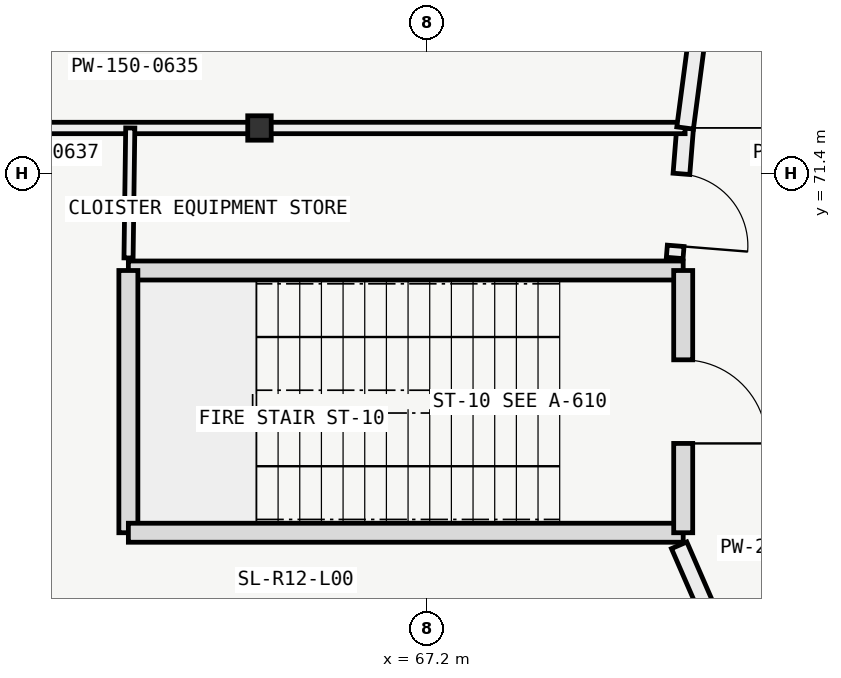
"""IFC4 building model, lengths in metres.
Left out: names, types, materials, properties, quantities, classifications, styles, units other than length and angle.
Written with IfcOpenShell. Run it as: python <this file> out.ifc"""

import sys

from ifc_helpers import new_model, si_unit, direction, frame, frame_2d, origin, origin_2d, place, context, subcontext, project, spatial, rectangle, i_section, extrude, element, fill, save


model = new_model("IFC4")
c1 = context("Model", 3, precision=1e-05, world=origin(), true_north=direction((0.0, 1.0)))
c2 = subcontext(c1, "Body", "Model", "MODEL_VIEW")
j1 = project(units=[si_unit("LENGTHUNIT", "METRE"), si_unit("PLANEANGLEUNIT", "RADIAN")], contexts=[c1])
p1 = place(None, origin())
s1 = spatial("IfcSite", under=j1, at=p1, CompositionType="ELEMENT")
p2 = place(p1, origin())
s2 = spatial("IfcBuilding", under=s1, at=p2, CompositionType="ELEMENT")
p3 = place(p2, origin())
s3 = spatial("IfcBuildingStorey", under=s2, at=p3, CompositionType="ELEMENT", Elevation=0.0)
p4 = place(p3, frame((65.0, 72.0, -0.4), z_axis=(0.0, 0.0, 1.0), x_axis=(1.0, 0.0, 0.0)))
e1 = element("IfcColumn", 1, at=p4, inside=s3, PredefinedType="COLUMN", context=c2, shape_type="SweptSolid", body=[
    extrude(i_section(OverallWidth=0.309, OverallDepth=0.321, WebThickness=0.014, FlangeThickness=0.022, FilletRadius=0.017, at=origin_2d()), origin(), (0.0, 0.0, 1.0), 5.8),
])
p5 = place(p3, frame((70.575, 70.125, -0.4), z_axis=(0.0, 0.0, 1.0), x_axis=(-1.0, 0.0, 0.0)))
e2 = element("IfcWall", 2, at=p5, inside=s3, PredefinedType="SOLIDWALL", context=c2, shape_type="SweptSolid", body=[
    extrude(rectangle(XDim=7.3, YDim=0.25, at=frame_2d((3.65, 0.0))), origin(), (0.0, 0.0, 1.0), 5.52),
])
p6 = place(p3, frame((63.275, 70.125, -0.4), z_axis=(0.0, 0.0, 1.0), x_axis=(0.0, -1.0, 0.0)))
e3 = element("IfcWall", 3, at=p6, inside=s3, PredefinedType="SOLIDWALL", context=c2, shape_type="SweptSolid", body=[
    extrude(rectangle(XDim=3.45, YDim=0.25, at=frame_2d((1.725, 0.0))), origin(), (0.0, 0.0, 1.0), 5.52),
])
p7 = place(p3, frame((63.275, 66.675, -0.4), z_axis=(0.0, 0.0, 1.0), x_axis=(1.0, 0.0, 0.0)))
e4 = element("IfcWall", 4, at=p7, inside=s3, PredefinedType="SOLIDWALL", context=c2, shape_type="SweptSolid", body=[
    extrude(rectangle(XDim=7.3, YDim=0.25, at=frame_2d((3.65, 0.0))), origin(), (0.0, 0.0, 1.0), 5.52),
])
p8 = place(p3, frame((70.575, 70.125, -0.4), z_axis=(0.0, 0.0, 1.0), x_axis=(0.0, -1.0, 0.0)))
e5 = element("IfcWall", 5, at=p8, inside=s3, PredefinedType="SOLIDWALL", context=c2, shape_type="SweptSolid", body=[
    extrude(rectangle(XDim=3.45, YDim=0.25, at=frame_2d((1.725, 0.0))), origin(), (0.0, 0.0, 1.0), 5.52),
])
p9 = place(p8, frame((1.175, 0.0, 0.4)))
e6 = element("IfcOpeningElement", 6, at=p9, cuts=e5, PredefinedType="OPENING", context=c2, shape_type="SweptSolid", body=[
    extrude(rectangle(XDim=1.1, YDim=2.2, at=frame_2d((0.55, 1.1))), frame((0.0, 0.135, 0.0), z_axis=(0.0, -1.0, 0.0), x_axis=(1.0, 0.0, 0.0)), (0.0, 0.0, 1.0), 0.27),
])
p10 = place(p3, frame((70.6, 72.0, 0.0), z_axis=(0.0, 0.0, 1.0), x_axis=(-0.07984138391, -0.996807580938, 0.0)))
e7 = element("IfcWall", 7, at=p10, inside=s3, PredefinedType="PARTITIONING", context=c2, shape_type="SweptSolid", body=[
    extrude(rectangle(XDim=1.715, YDim=0.22, at=frame_2d((0.858, 0.0))), origin(), (0.0, 0.0, 1.0), 4.567),
])
p11 = place(p10, frame((0.605, 0.0, 0.0)))
e8 = element("IfcOpeningElement", 8, at=p11, cuts=e7, PredefinedType="OPENING", context=c2, shape_type="SweptSolid", body=[
    extrude(rectangle(XDim=0.95, YDim=2.1, at=frame_2d((0.475, 1.05))), frame((0.0, 0.12, 0.0), z_axis=(0.0, -1.0, 0.0), x_axis=(1.0, 0.0, 0.0)), (0.0, 0.0, 1.0), 0.24),
])
p12 = place(p3, frame((70.522, 66.51, 0.0), z_axis=(0.0, 0.0, 1.0), x_axis=(0.399219580964, -0.916855346374, 0.0)))
e9 = element("IfcWall", 9, at=p12, inside=s3, PredefinedType="PARTITIONING", context=c2, shape_type="SweptSolid", body=[
    extrude(rectangle(XDim=2.876, YDim=0.22, at=frame_2d((1.438, 0.0))), origin(), (0.0, 0.0, 1.0), 4.567),
])
p13 = place(p12, frame((1.17, 0.0, 0.0)))
e10 = element("IfcOpeningElement", 10, at=p13, cuts=e9, PredefinedType="OPENING", context=c2, shape_type="SweptSolid", body=[
    extrude(rectangle(XDim=1.5, YDim=2.2, at=frame_2d((0.75, 1.1))), frame((0.0, 0.12, 0.0), z_axis=(0.0, -1.0, 0.0), x_axis=(1.0, 0.0, 0.0)), (0.0, 0.0, 1.0), 0.24),
])
p14 = place(p3, frame((70.6, 72.0, 0.0), z_axis=(0.0, 0.0, 1.0), x_axis=(-1.0, 0.0, 0.0)))
e11 = element("IfcWall", 11, at=p14, inside=s3, PredefinedType="PARTITIONING", context=c2, shape_type="SweptSolid", body=[
    extrude(rectangle(XDim=14.48, YDim=0.15, at=frame_2d((7.24, 0.0))), origin(), (0.0, 0.0, 1.0), 4.567),
])
p15 = place(p3, frame((63.277, 70.29, 0.0), z_axis=(0.0, 0.0, 1.0), x_axis=(0.013419693814, 0.999909951855, 0.0)))
e12 = element("IfcWall", 12, at=p15, inside=s3, PredefinedType="PARTITIONING", context=c2, shape_type="SweptSolid", body=[
    extrude(rectangle(XDim=1.71, YDim=0.12, at=frame_2d((0.855, 0.0))), origin(), (0.0, 0.0, 1.0), 4.567),
])
p16 = place(p3, frame((71.67, 80.127, 0.0), z_axis=(0.0, 0.0, 1.0), x_axis=(-0.130513066404, -0.991446589332, 0.0)))
e13 = element("IfcWall", 13, at=p16, inside=s3, PredefinedType="PARTITIONING", context=c2, shape_type="SweptSolid", body=[
    extrude(rectangle(XDim=8.197, YDim=0.22, at=frame_2d((4.099, 0.0))), origin(), (0.0, 0.0, 1.0), 4.567),
])
p17 = place(p9, origin())
e14 = element("IfcDoor", 14, at=p17, inside=s3, OperationType="SINGLE_SWING_RIGHT", PredefinedType="DOOR", context=c2, shape_type="SweptSolid", body=[
    extrude(rectangle(XDim=1.1, YDim=2.2, at=frame_2d((0.55, 1.1))), frame((0.0, 0.025, 0.0), z_axis=(0.0, -1.0, 0.0), x_axis=(1.0, 0.0, 0.0)), (0.0, 0.0, 1.0), 0.05),
])
fill(e6, e14)
p18 = place(p11, origin())
e15 = element("IfcDoor", 15, at=p18, inside=s3, OperationType="SINGLE_SWING_RIGHT", PredefinedType="DOOR", context=c2, shape_type="SweptSolid", body=[
    extrude(rectangle(XDim=0.95, YDim=2.1, at=frame_2d((0.475, 1.05))), frame((0.0, 0.025, 0.0), z_axis=(0.0, -1.0, 0.0), x_axis=(1.0, 0.0, 0.0)), (0.0, 0.0, 1.0), 0.05),
])
fill(e8, e15)
save(model, sys.argv[1])
